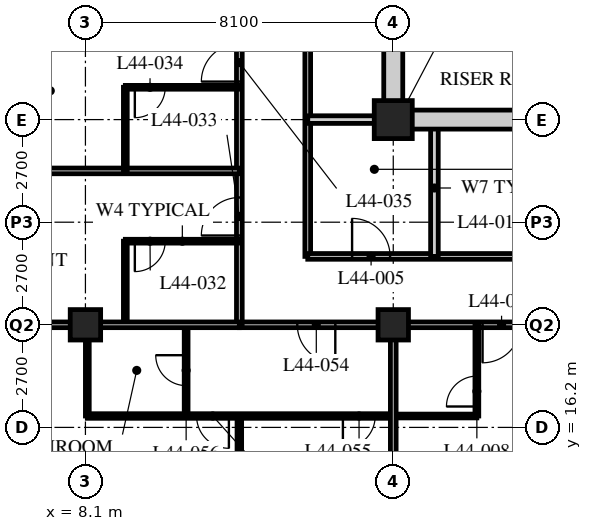
"""IFC4 building model, lengths in metres.
Left out: names, types, materials, properties, quantities, classifications, styles, units other than length and angle.
Written with IfcOpenShell. Run it as: python <this file> out.ifc"""

import sys

from ifc_helpers import new_model, si_unit, direction, frame, frame_2d, origin, origin_2d, place, context, subcontext, project, spatial, rectangle, hollow_rectangle, extrude, element, fill, save


model = new_model("IFC4")
c1 = context("Model", 3, precision=1e-05, world=origin(), true_north=direction((0.0, 1.0)))
c2 = subcontext(c1, "Body", "Model", "MODEL_VIEW")
j1 = project(units=[si_unit("LENGTHUNIT", "METRE"), si_unit("PLANEANGLEUNIT", "RADIAN")], contexts=[c1])
p1 = place(None, origin())
s1 = spatial("IfcSite", under=j1, at=p1, CompositionType="ELEMENT")
p2 = place(p1, origin())
s2 = spatial("IfcBuilding", under=s1, at=p2, CompositionType="ELEMENT")
p3 = place(p2, frame((0.0, 0.0, 174.0)))
s3 = spatial("IfcBuildingStorey", under=s2, at=p3, CompositionType="ELEMENT", Elevation=174.0)
for number, where, z_axis, x_axis in (
    (1, (8.1, 18.9, 0.0), (0.0, 0.0, 1.0), (1.0, 0.0, 0.0)),
    (2, (16.2, 18.9, 0.0), (0.0, 0.0, 1.0), (1.0, 0.0, 0.0)),
):
    element("IfcColumn", number, at=place(p3, frame(where, z_axis=z_axis, x_axis=x_axis)), inside=s3, PredefinedType="COLUMN", context=c2, shape_type="SweptSolid", body=[
        extrude(hollow_rectangle(XDim=0.8, YDim=0.8, WallThickness=0.08, at=origin_2d()), origin(), (0.0, 0.0, 1.0), 3.6),
    ])
p4 = place(p3, frame((16.2, 24.3, 0.0), z_axis=(0.0, 0.0, 1.0), x_axis=(1.0, 0.0, 0.0)))
e3 = element("IfcColumn", 3, at=p4, inside=s3, PredefinedType="COLUMN", context=c2, shape_type="SweptSolid", body=[
    extrude(hollow_rectangle(XDim=1.0, YDim=1.0, WallThickness=0.1, at=origin_2d()), origin(), (0.0, 0.0, 1.0), 3.6),
])
p5 = place(p3, frame((12.15, 18.9, 0.0), z_axis=(0.0, 0.0, 1.0), x_axis=(1.0, 0.0, 0.0)))
e4 = element("IfcWall", 4, at=p5, inside=s3, PredefinedType="PARTITIONING", context=c2, shape_type="SweptSolid", body=[
    extrude(rectangle(XDim=32.4, YDim=0.15, at=frame_2d((16.2, 0.0))), origin(), (0.0, 0.0, 1.0), 2.778),
])
p6 = place(p5, frame((6.4, 0.0, 0.0)))
e5 = element("IfcOpeningElement", 5, at=p6, cuts=e4, PredefinedType="OPENING", context=c2, shape_type="SweptSolid", body=[
    extrude(rectangle(XDim=1.0, YDim=2.1, at=frame_2d((0.5, 1.05))), frame((0.0, 0.085, 0.0), z_axis=(0.0, -1.0, 0.0), x_axis=(1.0, 0.0, 0.0)), (0.0, 0.0, 1.0), 0.17),
])
p7 = place(p5, frame((8.8, 0.0, 0.0)))
e6 = element("IfcOpeningElement", 6, at=p7, cuts=e4, PredefinedType="OPENING", context=c2, shape_type="SweptSolid", body=[
    extrude(rectangle(XDim=1.0, YDim=2.1, at=frame_2d((0.5, 1.05))), frame((0.0, 0.085, 0.0), z_axis=(0.0, -1.0, 0.0), x_axis=(1.0, 0.0, 0.0)), (0.0, 0.0, 1.0), 0.17),
])
p8 = place(p5, frame((13.05, 0.0, 0.0)))
e7 = element("IfcOpeningElement", 7, at=p8, cuts=e4, PredefinedType="OPENING", context=c2, shape_type="SweptSolid", body=[
    extrude(rectangle(XDim=1.0, YDim=2.1, at=frame_2d((0.5, 1.05))), frame((0.0, 0.085, 0.0), z_axis=(0.0, -1.0, 0.0), x_axis=(1.0, 0.0, 0.0)), (0.0, 0.0, 1.0), 0.17),
])
p9 = place(p5, frame((22.6, 0.0, 0.0)))
e8 = element("IfcOpeningElement", 8, at=p9, cuts=e4, PredefinedType="OPENING", context=c2, shape_type="SweptSolid", body=[
    extrude(rectangle(XDim=1.0, YDim=2.1, at=frame_2d((0.5, 1.05))), frame((0.0, 0.085, 0.0), z_axis=(0.0, -1.0, 0.0), x_axis=(1.0, 0.0, 0.0)), (0.0, 0.0, 1.0), 0.17),
])
p10 = place(p5, frame((25.0, 0.0, 0.0)))
e9 = element("IfcOpeningElement", 9, at=p10, cuts=e4, PredefinedType="OPENING", context=c2, shape_type="SweptSolid", body=[
    extrude(rectangle(XDim=1.0, YDim=2.1, at=frame_2d((0.5, 1.05))), frame((0.0, 0.085, 0.0), z_axis=(0.0, -1.0, 0.0), x_axis=(1.0, 0.0, 0.0)), (0.0, 0.0, 1.0), 0.17),
])
p11 = place(p5, frame((1.525, 0.0, 0.0)))
e10 = element("IfcOpeningElement", 10, at=p11, cuts=e4, PredefinedType="OPENING", context=c2, shape_type="SweptSolid", body=[
    extrude(rectangle(XDim=1.0, YDim=2.1, at=frame_2d((0.5, 1.05))), frame((0.0, 0.085, 0.0), z_axis=(0.0, -1.0, 0.0), x_axis=(1.0, 0.0, 0.0)), (0.0, 0.0, 1.0), 0.17),
])
p12 = place(p5, frame((29.875, 0.0, 0.0)))
e11 = element("IfcOpeningElement", 11, at=p12, cuts=e4, PredefinedType="OPENING", context=c2, shape_type="SweptSolid", body=[
    extrude(rectangle(XDim=1.0, YDim=2.1, at=frame_2d((0.5, 1.05))), frame((0.0, 0.085, 0.0), z_axis=(0.0, -1.0, 0.0), x_axis=(1.0, 0.0, 0.0)), (0.0, 0.0, 1.0), 0.17),
])
p13 = place(p3, frame((12.15, 18.9, 0.0), z_axis=(0.0, 0.0, 1.0), x_axis=(0.0, 1.0, 0.0)))
e12 = element("IfcWall", 12, at=p13, inside=s3, PredefinedType="PARTITIONING", context=c2, shape_type="SweptSolid", body=[
    extrude(rectangle(XDim=24.3, YDim=0.15, at=frame_2d((12.15, 0.0))), origin(), (0.0, 0.0, 1.0), 3.39),
])
p14 = place(p13, frame((2.35, 0.0, 0.0)))
e13 = element("IfcOpeningElement", 13, at=p14, cuts=e12, PredefinedType="OPENING", context=c2, shape_type="SweptSolid", body=[
    extrude(rectangle(XDim=1.0, YDim=2.1, at=frame_2d((0.5, 1.05))), frame((0.0, 0.085, 0.0), z_axis=(0.0, -1.0, 0.0), x_axis=(1.0, 0.0, 0.0)), (0.0, 0.0, 1.0), 0.17),
])
p15 = place(p13, frame((6.4, 0.0, 0.0)))
e14 = element("IfcOpeningElement", 14, at=p15, cuts=e12, PredefinedType="OPENING", context=c2, shape_type="SweptSolid", body=[
    extrude(rectangle(XDim=1.0, YDim=2.1, at=frame_2d((0.5, 1.05))), frame((0.0, 0.085, 0.0), z_axis=(0.0, -1.0, 0.0), x_axis=(1.0, 0.0, 0.0)), (0.0, 0.0, 1.0), 0.17),
])
p16 = place(p13, frame((8.5, 0.0, 0.0)))
e15 = element("IfcOpeningElement", 15, at=p16, cuts=e12, PredefinedType="OPENING", context=c2, shape_type="SweptSolid", body=[
    extrude(rectangle(XDim=1.0, YDim=2.1, at=frame_2d((0.5, 1.05))), frame((0.0, 0.085, 0.0), z_axis=(0.0, -1.0, 0.0), x_axis=(1.0, 0.0, 0.0)), (0.0, 0.0, 1.0), 0.17),
])
p17 = place(p13, frame((16.6, 0.0, 0.0)))
e16 = element("IfcOpeningElement", 16, at=p17, cuts=e12, PredefinedType="OPENING", context=c2, shape_type="SweptSolid", body=[
    extrude(rectangle(XDim=1.0, YDim=2.1, at=frame_2d((0.5, 1.05))), frame((0.0, 0.085, 0.0), z_axis=(0.0, -1.0, 0.0), x_axis=(1.0, 0.0, 0.0)), (0.0, 0.0, 1.0), 0.17),
])
p18 = place(p3, frame((13.95, 40.5, 0.0), z_axis=(0.0, 0.0, 1.0), x_axis=(0.0, -1.0, 0.0)))
e17 = element("IfcWall", 17, at=p18, inside=s3, PredefinedType="PARTITIONING", context=c2, shape_type="SweptSolid", body=[
    extrude(rectangle(XDim=19.8, YDim=0.15, at=frame_2d((9.9, 0.0))), origin(), (0.0, 0.0, 1.0), 3.39),
])
p19 = place(p18, frame((11.65, 0.0, 0.0)))
e18 = element("IfcOpeningElement", 18, at=p19, cuts=e17, PredefinedType="OPENING", context=c2, shape_type="SweptSolid", body=[
    extrude(rectangle(XDim=1.0, YDim=2.1, at=frame_2d((0.5, 1.05))), frame((0.0, 0.085, 0.0), z_axis=(0.0, -1.0, 0.0), x_axis=(1.0, 0.0, 0.0)), (0.0, 0.0, 1.0), 0.17),
])
p20 = place(p18, frame((3.55, 0.0, 0.0)))
e19 = element("IfcOpeningElement", 19, at=p20, cuts=e17, PredefinedType="OPENING", context=c2, shape_type="SweptSolid", body=[
    extrude(rectangle(XDim=1.0, YDim=2.1, at=frame_2d((0.5, 1.05))), frame((0.0, 0.085, 0.0), z_axis=(0.0, -1.0, 0.0), x_axis=(1.0, 0.0, 0.0)), (0.0, 0.0, 1.0), 0.17),
])
p21 = place(p3, frame((13.95, 20.7, 0.0), z_axis=(0.0, 0.0, 1.0), x_axis=(1.0, 0.0, 0.0)))
e20 = element("IfcWall", 20, at=p21, inside=s3, PredefinedType="PARTITIONING", context=c2, shape_type="SweptSolid", body=[
    extrude(rectangle(XDim=13.19, YDim=0.15, at=frame_2d((6.595, 0.0))), origin(), (0.0, 0.0, 1.0), 3.39),
])
p22 = place(p21, frame((1.167, 0.0, 0.0)))
e21 = element("IfcOpeningElement", 21, at=p22, cuts=e20, PredefinedType="OPENING", context=c2, shape_type="SweptSolid", body=[
    extrude(rectangle(XDim=1.0, YDim=2.1, at=frame_2d((0.5, 1.05))), frame((0.0, 0.085, 0.0), z_axis=(0.0, -1.0, 0.0), x_axis=(1.0, 0.0, 0.0)), (0.0, 0.0, 1.0), 0.17),
])
p23 = place(p21, frame((7.767, 0.0, 0.0)))
e22 = element("IfcOpeningElement", 22, at=p23, cuts=e20, PredefinedType="OPENING", context=c2, shape_type="SweptSolid", body=[
    extrude(rectangle(XDim=1.0, YDim=2.1, at=frame_2d((0.5, 1.05))), frame((0.0, 0.085, 0.0), z_axis=(0.0, -1.0, 0.0), x_axis=(1.0, 0.0, 0.0)), (0.0, 0.0, 1.0), 0.17),
])
p24 = place(p3, frame((17.283, 20.7, 0.0), z_axis=(0.0, 0.0, 1.0), x_axis=(0.0, 1.0, 0.0)))
e23 = element("IfcWall", 23, at=p24, inside=s3, PredefinedType="SOLIDWALL", context=c2, shape_type="SweptSolid", body=[
    extrude(rectangle(XDim=3.6, YDim=0.2, at=frame_2d((1.8, 0.0))), origin(), (0.0, 0.0, 1.0), 3.39),
])
p25 = place(p3, frame((13.95, 24.3, 0.0), z_axis=(0.0, 0.0, 1.0), x_axis=(1.0, 0.0, 0.0)))
e24 = element("IfcWall", 24, at=p25, inside=s3, PredefinedType="SOLIDWALL", context=c2, shape_type="SweptSolid", body=[
    extrude(rectangle(XDim=2.25, YDim=0.2, at=frame_2d((1.125, 0.0))), origin(), (0.0, 0.0, 1.0), 3.39),
])
p26 = place(p3, frame((16.2, 16.5, 0.0), z_axis=(0.0, 0.0, 1.0), x_axis=(1.0, 0.0, 0.0)))
e25 = element("IfcWall", 25, at=p26, inside=s3, PredefinedType="PARTITIONING", context=c2, shape_type="SweptSolid", body=[
    extrude(rectangle(XDim=2.2, YDim=0.1, at=frame_2d((1.1, 0.0))), origin(), (0.0, 0.0, 1.0), 3.39),
])
p27 = place(p3, frame((18.4, 18.9, 0.0), z_axis=(0.0, 0.0, 1.0), x_axis=(0.0, -1.0, 0.0)))
e26 = element("IfcWall", 26, at=p27, inside=s3, PredefinedType="PARTITIONING", context=c2, shape_type="SweptSolid", body=[
    extrude(rectangle(XDim=2.4, YDim=0.1, at=frame_2d((1.2, 0.0))), origin(), (0.0, 0.0, 1.0), 3.39),
])
p28 = place(p27, frame((1.35, 0.0, 0.0)))
e27 = element("IfcOpeningElement", 27, at=p28, cuts=e26, PredefinedType="OPENING", context=c2, shape_type="SweptSolid", body=[
    extrude(rectangle(XDim=0.8, YDim=2.1, at=frame_2d((0.4, 1.05))), frame((0.0, 0.06, 0.0), z_axis=(0.0, -1.0, 0.0), x_axis=(1.0, 0.0, 0.0)), (0.0, 0.0, 1.0), 0.12),
])
p29 = place(p3, frame((9.15, 18.9, 0.0), z_axis=(0.0, 0.0, 1.0), x_axis=(0.0, 1.0, 0.0)))
e28 = element("IfcWall", 28, at=p29, inside=s3, PredefinedType="PARTITIONING", context=c2, shape_type="SweptSolid", body=[
    extrude(rectangle(XDim=2.2, YDim=0.1, at=frame_2d((1.1, 0.0))), origin(), (0.0, 0.0, 1.0), 3.39),
])
p30 = place(p3, frame((12.15, 21.1, 0.0), z_axis=(0.0, 0.0, 1.0), x_axis=(-1.0, 0.0, 0.0)))
e29 = element("IfcWall", 29, at=p30, inside=s3, PredefinedType="PARTITIONING", context=c2, shape_type="SweptSolid", body=[
    extrude(rectangle(XDim=3.0, YDim=0.1, at=frame_2d((1.5, 0.0))), origin(), (0.0, 0.0, 1.0), 3.39),
])
p31 = place(p30, frame((1.95, 0.0, 0.0)))
e30 = element("IfcOpeningElement", 30, at=p31, cuts=e29, PredefinedType="OPENING", context=c2, shape_type="SweptSolid", body=[
    extrude(rectangle(XDim=0.8, YDim=2.1, at=frame_2d((0.4, 1.05))), frame((0.0, 0.06, 0.0), z_axis=(0.0, -1.0, 0.0), x_axis=(1.0, 0.0, 0.0)), (0.0, 0.0, 1.0), 0.12),
])
p32 = place(p3, frame((12.15, 22.95, 0.0), z_axis=(0.0, 0.0, 1.0), x_axis=(-1.0, 0.0, 0.0)))
e31 = element("IfcWall", 31, at=p32, inside=s3, PredefinedType="PARTITIONING", context=c2, shape_type="SweptSolid", body=[
    extrude(rectangle(XDim=11.85, YDim=0.15, at=frame_2d((5.925, 0.0))), origin(), (0.0, 0.0, 1.0), 3.39),
])
p33 = place(p3, frame((9.15, 22.95, 0.0), z_axis=(0.0, 0.0, 1.0), x_axis=(0.0, 1.0, 0.0)))
e32 = element("IfcWall", 32, at=p33, inside=s3, PredefinedType="PARTITIONING", context=c2, shape_type="SweptSolid", body=[
    extrude(rectangle(XDim=2.2, YDim=0.1, at=frame_2d((1.1, 0.0))), origin(), (0.0, 0.0, 1.0), 3.39),
])
p34 = place(p3, frame((12.15, 25.15, 0.0), z_axis=(0.0, 0.0, 1.0), x_axis=(-1.0, 0.0, 0.0)))
e33 = element("IfcWall", 33, at=p34, inside=s3, PredefinedType="PARTITIONING", context=c2, shape_type="SweptSolid", body=[
    extrude(rectangle(XDim=3.0, YDim=0.1, at=frame_2d((1.5, 0.0))), origin(), (0.0, 0.0, 1.0), 3.39),
])
p35 = place(p34, frame((1.95, 0.0, 0.0)))
e34 = element("IfcOpeningElement", 34, at=p35, cuts=e33, PredefinedType="OPENING", context=c2, shape_type="SweptSolid", body=[
    extrude(rectangle(XDim=0.8, YDim=2.1, at=frame_2d((0.4, 1.05))), frame((0.0, 0.06, 0.0), z_axis=(0.0, -1.0, 0.0), x_axis=(1.0, 0.0, 0.0)), (0.0, 0.0, 1.0), 0.12),
])
p36 = place(p3, frame((10.75, 18.9, 0.0), z_axis=(0.0, 0.0, 1.0), x_axis=(0.0, -1.0, 0.0)))
e35 = element("IfcWall", 35, at=p36, inside=s3, PredefinedType="PARTITIONING", context=c2, shape_type="SweptSolid", body=[
    extrude(rectangle(XDim=2.4, YDim=0.1, at=frame_2d((1.2, 0.0))), origin(), (0.0, 0.0, 1.0), 3.39),
])
p37 = place(p36, frame((0.8, 0.0, 0.0)))
e36 = element("IfcOpeningElement", 36, at=p37, cuts=e35, PredefinedType="OPENING", context=c2, shape_type="SweptSolid", body=[
    extrude(rectangle(XDim=0.8, YDim=2.1, at=frame_2d((0.4, 1.05))), frame((0.0, 0.06, 0.0), z_axis=(0.0, -1.0, 0.0), x_axis=(1.0, 0.0, 0.0)), (0.0, 0.0, 1.0), 0.12),
])
p38 = place(p3, frame((8.15, 18.9, 0.0), z_axis=(0.0, 0.0, 1.0), x_axis=(0.0, -1.0, 0.0)))
e37 = element("IfcWall", 37, at=p38, inside=s3, PredefinedType="PARTITIONING", context=c2, shape_type="SweptSolid", body=[
    extrude(rectangle(XDim=2.4, YDim=0.1, at=frame_2d((1.2, 0.0))), origin(), (0.0, 0.0, 1.0), 2.778),
])
p39 = place(p3, frame((8.15, 16.5, 0.0), z_axis=(0.0, 0.0, 1.0), x_axis=(1.0, 0.0, 0.0)))
e38 = element("IfcWall", 38, at=p39, inside=s3, PredefinedType="PARTITIONING", context=c2, shape_type="SweptSolid", body=[
    extrude(rectangle(XDim=8.05, YDim=0.12, at=frame_2d((4.025, 0.0))), origin(), (0.0, 0.0, 1.0), 3.39),
])
p40 = place(p39, frame((6.725, 0.0, 0.0)))
e39 = element("IfcOpeningElement", 39, at=p40, cuts=e38, PredefinedType="OPENING", context=c2, shape_type="SweptSolid", body=[
    extrude(rectangle(XDim=0.85, YDim=2.1, at=frame_2d((0.425, 1.05))), frame((0.0, 0.07, 0.0), z_axis=(0.0, -1.0, 0.0), x_axis=(1.0, 0.0, 0.0)), (0.0, 0.0, 1.0), 0.14),
])
p41 = place(p39, frame((2.875, 0.0, 0.0)))
e40 = element("IfcOpeningElement", 40, at=p41, cuts=e38, PredefinedType="OPENING", context=c2, shape_type="SweptSolid", body=[
    extrude(rectangle(XDim=0.85, YDim=2.1, at=frame_2d((0.425, 1.05))), frame((0.0, 0.07, 0.0), z_axis=(0.0, -1.0, 0.0), x_axis=(1.0, 0.0, 0.0)), (0.0, 0.0, 1.0), 0.14),
])
p42 = place(p3, frame((12.15, 16.5, 0.0), z_axis=(0.0, 0.0, 1.0), x_axis=(0.0, -1.0, 0.0)))
e41 = element("IfcWall", 41, at=p42, inside=s3, PredefinedType="PARTITIONING", context=c2, shape_type="SweptSolid", body=[
    extrude(rectangle(XDim=5.4, YDim=0.12, at=frame_2d((2.7, 0.0))), origin(), (0.0, 0.0, 1.0), 3.39),
])
for number, where, z_axis, x_axis in (
    (42, (4.35, 18.9, 0.0), (0.0, 0.0, 1.0), (1.0, 0.0, 0.0)),
    (43, (16.2, 18.9, 0.0), (0.0, 0.0, 1.0), (0.0, -1.0, 0.0)),
):
    element("IfcWall", number, at=place(p3, frame(where, z_axis=z_axis, x_axis=x_axis)), inside=s3, PredefinedType="PARTITIONING", context=c2, shape_type="SweptSolid", body=[
        extrude(rectangle(XDim=7.8, YDim=0.15, at=frame_2d((3.9, 0.0))), origin(), (0.0, 0.0, 1.0), 2.778),
    ])
p43 = place(p3, frame((15.95, 24.3, 0.0), z_axis=(0.0, 0.0, 1.0), x_axis=(1.0, 0.0, 0.0)))
e44 = element("IfcWall", 44, at=p43, inside=s3, PredefinedType="SOLIDWALL", context=c2, shape_type="SweptSolid", body=[
    extrude(rectangle(XDim=24.8, YDim=0.5, at=frame_2d((12.4, 0.0))), origin(), (0.0, 0.0, 1.0), 2.74),
])
p44 = place(p43, frame((11.5, 0.0, 0.0)))
e45 = element("IfcOpeningElement", 45, at=p44, cuts=e44, PredefinedType="OPENING", context=c2, shape_type="SweptSolid", body=[
    extrude(rectangle(XDim=1.8, YDim=2.4, at=frame_2d((0.9, 1.2))), frame((0.0, 0.26, 0.0), z_axis=(0.0, -1.0, 0.0), x_axis=(1.0, 0.0, 0.0)), (0.0, 0.0, 1.0), 0.52),
])
p45 = place(p3, frame((16.2, 24.55, 0.0), z_axis=(0.0, 0.0, 1.0), x_axis=(0.0, 1.0, 0.0)))
e46 = element("IfcWall", 46, at=p45, inside=s3, PredefinedType="SOLIDWALL", context=c2, shape_type="SweptSolid", body=[
    extrude(rectangle(XDim=15.7, YDim=0.5, at=frame_2d((7.85, 0.0))), origin(), (0.0, 0.0, 1.0), 2.778),
])
p46 = place(p22, origin())
e47 = element("IfcDoor", 47, at=p46, inside=s3, OperationType="SINGLE_SWING_LEFT", PredefinedType="DOOR", context=c2, shape_type="SweptSolid", body=[
    extrude(rectangle(XDim=1.0, YDim=2.1, at=frame_2d((0.5, 1.05))), frame((0.0, 0.025, 0.0), z_axis=(0.0, -1.0, 0.0), x_axis=(1.0, 0.0, 0.0)), (0.0, 0.0, 1.0), 0.05),
])
fill(e21, e47)
p47 = place(p28, origin())
e48 = element("IfcDoor", 48, at=p47, inside=s3, OperationType="SINGLE_SWING_LEFT", PredefinedType="DOOR", context=c2, shape_type="SweptSolid", body=[
    extrude(rectangle(XDim=0.8, YDim=2.1, at=frame_2d((0.4, 1.05))), frame((0.0, 0.025, 0.0), z_axis=(0.0, -1.0, 0.0), x_axis=(1.0, 0.0, 0.0)), (0.0, 0.0, 1.0), 0.05),
])
fill(e27, e48)
p48 = place(p6, origin())
e49 = element("IfcDoor", 49, at=p48, inside=s3, OperationType="SINGLE_SWING_RIGHT", PredefinedType="DOOR", context=c2, shape_type="SweptSolid", body=[
    extrude(rectangle(XDim=1.0, YDim=2.1, at=frame_2d((0.5, 1.05))), frame((0.0, 0.025, 0.0), z_axis=(0.0, -1.0, 0.0), x_axis=(1.0, 0.0, 0.0)), (0.0, 0.0, 1.0), 0.05),
])
fill(e5, e49)
p49 = place(p31, origin())
e50 = element("IfcDoor", 50, at=p49, inside=s3, OperationType="SINGLE_SWING_RIGHT", PredefinedType="DOOR", context=c2, shape_type="SweptSolid", body=[
    extrude(rectangle(XDim=0.8, YDim=2.1, at=frame_2d((0.4, 1.05))), frame((0.0, 0.025, 0.0), z_axis=(0.0, -1.0, 0.0), x_axis=(1.0, 0.0, 0.0)), (0.0, 0.0, 1.0), 0.05),
])
fill(e30, e50)
p50 = place(p14, origin())
e51 = element("IfcDoor", 51, at=p50, inside=s3, OperationType="SINGLE_SWING_LEFT", PredefinedType="DOOR", context=c2, shape_type="SweptSolid", body=[
    extrude(rectangle(XDim=1.0, YDim=2.1, at=frame_2d((0.5, 1.05))), frame((0.0, 0.025, 0.0), z_axis=(0.0, -1.0, 0.0), x_axis=(1.0, 0.0, 0.0)), (0.0, 0.0, 1.0), 0.05),
])
fill(e13, e51)
p51 = place(p35, origin())
e52 = element("IfcDoor", 52, at=p51, inside=s3, OperationType="SINGLE_SWING_RIGHT", PredefinedType="DOOR", context=c2, shape_type="SweptSolid", body=[
    extrude(rectangle(XDim=0.8, YDim=2.1, at=frame_2d((0.4, 1.05))), frame((0.0, 0.025, 0.0), z_axis=(0.0, -1.0, 0.0), x_axis=(1.0, 0.0, 0.0)), (0.0, 0.0, 1.0), 0.05),
])
fill(e34, e52)
p52 = place(p15, origin())
e53 = element("IfcDoor", 53, at=p52, inside=s3, OperationType="SINGLE_SWING_LEFT", PredefinedType="DOOR", context=c2, shape_type="SweptSolid", body=[
    extrude(rectangle(XDim=1.0, YDim=2.1, at=frame_2d((0.5, 1.05))), frame((0.0, 0.025, 0.0), z_axis=(0.0, -1.0, 0.0), x_axis=(1.0, 0.0, 0.0)), (0.0, 0.0, 1.0), 0.05),
])
fill(e14, e53)
p53 = place(p11, origin())
e54 = element("IfcDoor", 54, at=p53, inside=s3, OperationType="SINGLE_SWING_LEFT", PredefinedType="DOOR", context=c2, shape_type="SweptSolid", body=[
    extrude(rectangle(XDim=1.0, YDim=2.1, at=frame_2d((0.5, 1.05))), frame((0.0, 0.025, 0.0), z_axis=(0.0, -1.0, 0.0), x_axis=(1.0, 0.0, 0.0)), (0.0, 0.0, 1.0), 0.05),
])
fill(e10, e54)
p54 = place(p40, origin())
e55 = element("IfcDoor", 55, at=p54, inside=s3, OperationType="SINGLE_SWING_RIGHT", PredefinedType="DOOR", context=c2, shape_type="SweptSolid", body=[
    extrude(rectangle(XDim=0.85, YDim=2.1, at=frame_2d((0.425, 1.05))), frame((0.0, 0.025, 0.0), z_axis=(0.0, -1.0, 0.0), x_axis=(1.0, 0.0, 0.0)), (0.0, 0.0, 1.0), 0.05),
])
fill(e39, e55)
p55 = place(p37, origin())
e56 = element("IfcDoor", 56, at=p55, inside=s3, OperationType="SINGLE_SWING_RIGHT", PredefinedType="DOOR", context=c2, shape_type="SweptSolid", body=[
    extrude(rectangle(XDim=0.8, YDim=2.1, at=frame_2d((0.4, 1.05))), frame((0.0, 0.025, 0.0), z_axis=(0.0, -1.0, 0.0), x_axis=(1.0, 0.0, 0.0)), (0.0, 0.0, 1.0), 0.05),
])
fill(e36, e56)
p56 = place(p41, origin())
e57 = element("IfcDoor", 57, at=p56, inside=s3, OperationType="SINGLE_SWING_LEFT", PredefinedType="DOOR", context=c2, shape_type="SweptSolid", body=[
    extrude(rectangle(XDim=0.85, YDim=2.1, at=frame_2d((0.425, 1.05))), frame((0.0, 0.025, 0.0), z_axis=(0.0, -1.0, 0.0), x_axis=(1.0, 0.0, 0.0)), (0.0, 0.0, 1.0), 0.05),
])
fill(e40, e57)
save(model, sys.argv[1])
